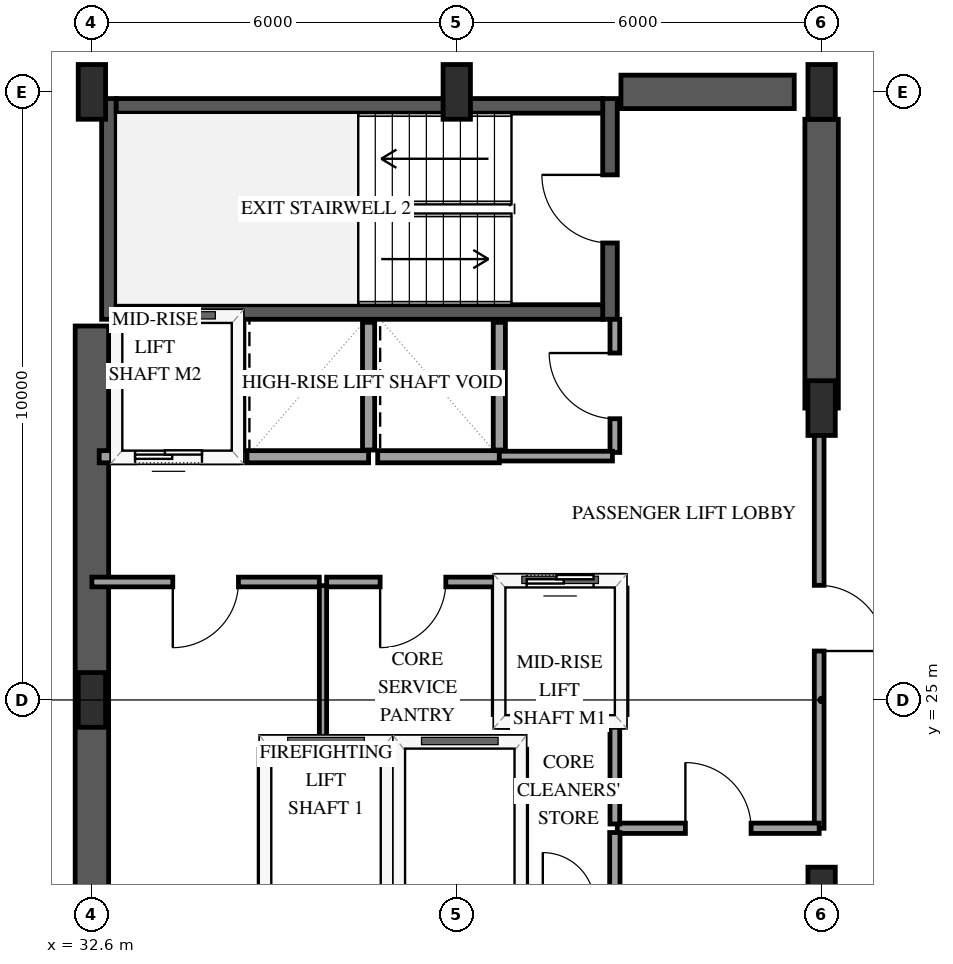
"""IFC4 building model, lengths in metres.
Left out: names, types, materials, properties, quantities, classifications, styles, units other than length and angle.
Written with IfcOpenShell. Run it as: python <this file> out.ifc"""

import sys

from ifc_helpers import new_model, si_unit, direction, frame, frame_2d, origin, origin_2d, place, context, subcontext, project, spatial, rectangle, extrude, element, fill, save


model = new_model("IFC4")
c1 = context("Model", 3, precision=1e-05, world=origin(), true_north=direction((0.0, 1.0)))
c2 = subcontext(c1, "Body", "Model", "MODEL_VIEW")
j1 = project(units=[si_unit("LENGTHUNIT", "METRE"), si_unit("PLANEANGLEUNIT", "RADIAN")], contexts=[c1])
p1 = place(None, origin())
s1 = spatial("IfcSite", under=j1, at=p1, CompositionType="ELEMENT")
p2 = place(p1, origin())
s2 = spatial("IfcBuilding", under=s1, at=p2, CompositionType="ELEMENT")
p3 = place(p2, frame((0.0, 0.0, 171.4)))
s3 = spatial("IfcBuildingStorey", under=s2, at=p3, CompositionType="ELEMENT", Elevation=171.4)
p4 = place(p3, frame((32.88, 31.26, 0.0), z_axis=(0.0, 0.0, 1.0), x_axis=(0.0, 1.0, 0.0)))
e1 = element("IfcWall", 1, at=p4, inside=s3, PredefinedType="SHEAR", context=c2, shape_type="SweptSolid", body=[
    extrude(rectangle(XDim=3.63, YDim=0.24, at=frame_2d((1.815, 0.0))), origin(), (0.0, 0.0, 1.0), 3.6),
])
p5 = place(p3, frame((41.12, 31.26, 0.0), z_axis=(0.0, 0.0, 1.0), x_axis=(0.0, 1.0, 0.0)))
e2 = element("IfcWall", 2, at=p5, inside=s3, PredefinedType="SHEAR", context=c2, shape_type="SweptSolid", body=[
    extrude(rectangle(XDim=3.63, YDim=0.24, at=frame_2d((1.815, 0.0))), origin(), (0.0, 0.0, 1.0), 3.6),
])
p6 = place(p5, frame((1.255, 0.0, 0.0)))
e3 = element("IfcOpeningElement", 3, at=p6, cuts=e2, PredefinedType="OPENING", context=c2, shape_type="SweptSolid", body=[
    extrude(rectangle(XDim=1.12, YDim=2.15, at=frame_2d((0.56, 1.075))), frame((0.0, 0.13, 0.0), z_axis=(0.0, -1.0, 0.0), x_axis=(1.0, 0.0, 0.0)), (0.0, 0.0, 1.0), 0.26),
])
for number, where, z_axis, x_axis in (
    (4, (33.0, 31.38, 0.0), (0.0, 0.0, 1.0), (1.0, 0.0, 0.0)),
    (5, (33.0, 34.77, 0.0), (0.0, 0.0, 1.0), (1.0, 0.0, 0.0)),
):
    element("IfcWall", number, at=place(p3, frame(where, z_axis=z_axis, x_axis=x_axis)), inside=s3, PredefinedType="SHEAR", context=c2, shape_type="SweptSolid", body=[
        extrude(rectangle(XDim=8.0, YDim=0.24, at=frame_2d((4.0, 0.0))), origin(), (0.0, 0.0, 1.0), 3.6),
    ])
p7 = place(p3, frame((32.6, 18.85, 0.0), z_axis=(0.0, 0.0, 1.0), x_axis=(0.0, 1.0, 0.0)))
e6 = element("IfcWall", 6, at=p7, inside=s3, PredefinedType="SHEAR", context=c2, shape_type="SweptSolid", body=[
    extrude(rectangle(XDim=12.3, YDim=0.55, at=frame_2d((6.15, 0.0))), origin(), (0.0, 0.0, 1.0), 3.6),
])
p8 = place(p3, frame((41.3, 35.0, 0.0), z_axis=(0.0, 0.0, 1.0), x_axis=(1.0, 0.0, 0.0)))
e7 = element("IfcWall", 7, at=p8, inside=s3, PredefinedType="SHEAR", context=c2, shape_type="SweptSolid", body=[
    extrude(rectangle(XDim=2.85, YDim=0.55, at=frame_2d((1.425, 0.0))), origin(), (0.0, 0.0, 1.0), 3.6),
])
p9 = place(p3, frame((44.6, 29.8, 0.0), z_axis=(0.0, 0.0, 1.0), x_axis=(0.0, 1.0, 0.0)))
e8 = element("IfcWall", 8, at=p9, inside=s3, PredefinedType="SHEAR", context=c2, shape_type="SweptSolid", body=[
    extrude(rectangle(XDim=4.75, YDim=0.55, at=frame_2d((2.375, 0.0))), origin(), (0.0, 0.0, 1.0), 3.6),
])
for number, where, z_axis, x_axis in (
    (9, (32.6, 25.0, 0.0), (0.0, 0.0, 1.0), (1.0, 0.0, 0.0)),
    (10, (32.6, 35.0, 0.0), (0.0, 0.0, 1.0), (1.0, 0.0, 0.0)),
    (11, (38.6, 35.0, 0.0), (0.0, 0.0, 1.0), (1.0, 0.0, 0.0)),
    (12, (44.6, 21.8, 0.0), (0.0, 0.0, 1.0), (1.0, 0.0, 0.0)),
    (13, (44.6, 29.8, 0.0), (0.0, 0.0, 1.0), (1.0, 0.0, 0.0)),
    (14, (44.6, 35.0, 0.0), (0.0, 0.0, 1.0), (1.0, 0.0, 0.0)),
):
    element("IfcColumn", number, at=place(p3, frame(where, z_axis=z_axis, x_axis=x_axis)), inside=s3, PredefinedType="PILASTER", context=c2, shape_type="SweptSolid", body=[
        extrude(rectangle(XDim=0.45, YDim=0.9, at=origin_2d()), origin(), (0.0, 0.0, 1.0), 3.6),
    ])
p10 = place(p3, frame((35.45, 24.3, 0.0), z_axis=(0.0, 0.0, 1.0), x_axis=(1.0, 0.0, 0.0)))
e15 = element("IfcWall", 15, at=p10, inside=s3, PredefinedType="SOLIDWALL", context=c2, shape_type="SweptSolid", body=[
    extrude(rectangle(XDim=2.0, YDim=0.2, at=frame_2d((1.0, 0.0))), origin(), (0.0, 0.0, 1.0), 3.3),
])
for number, where, z_axis, x_axis in (
    (16, (35.45, 21.81, 0.0), (0.0, 0.0, 1.0), (0.0, 1.0, 0.0)),
    (17, (37.45, 21.81, 0.0), (0.0, 0.0, 1.0), (0.0, 1.0, 0.0)),
):
    element("IfcWall", number, at=place(p3, frame(where, z_axis=z_axis, x_axis=x_axis)), inside=s3, PredefinedType="SOLIDWALL", context=c2, shape_type="SweptSolid", body=[
        extrude(rectangle(XDim=2.38, YDim=0.2, at=frame_2d((1.19, 0.0))), origin(), (0.0, 0.0, 1.0), 3.3),
    ])
p11 = place(p3, frame((37.65, 24.3, 0.0), z_axis=(0.0, 0.0, 1.0), x_axis=(1.0, 0.0, 0.0)))
e18 = element("IfcWall", 18, at=p11, inside=s3, PredefinedType="SOLIDWALL", context=c2, shape_type="SweptSolid", body=[
    extrude(rectangle(XDim=2.0, YDim=0.2, at=frame_2d((1.0, 0.0))), origin(), (0.0, 0.0, 1.0), 3.3),
])
p12 = place(p3, frame((39.65, 21.81, 0.0), z_axis=(0.0, 0.0, 1.0), x_axis=(0.0, 1.0, 0.0)))
e19 = element("IfcWall", 19, at=p12, inside=s3, PredefinedType="SOLIDWALL", context=c2, shape_type="SweptSolid", body=[
    extrude(rectangle(XDim=2.38, YDim=0.2, at=frame_2d((1.19, 0.0))), origin(), (0.0, 0.0, 1.0), 3.3),
])
p13 = place(p3, frame((39.3, 24.65, 0.0), z_axis=(0.0, 0.0, 1.0), x_axis=(1.0, 0.0, 0.0)))
e20 = element("IfcWall", 20, at=p13, inside=s3, PredefinedType="SOLIDWALL", context=c2, shape_type="SweptSolid", body=[
    extrude(rectangle(XDim=2.0, YDim=0.2, at=frame_2d((1.0, 0.0))), origin(), (0.0, 0.0, 1.0), 3.3),
])
p14 = place(p3, frame((39.3, 26.95, 0.0), z_axis=(0.0, 0.0, 1.0), x_axis=(1.0, 0.0, 0.0)))
e21 = element("IfcWall", 21, at=p14, inside=s3, PredefinedType="SOLIDWALL", context=c2, shape_type="SweptSolid", body=[
    extrude(rectangle(XDim=2.0, YDim=0.2, at=frame_2d((1.0, 0.0))), origin(), (0.0, 0.0, 1.0), 3.3),
])
p15 = place(p14, frame((0.45, 0.0, 0.0)))
e22 = element("IfcOpeningElement", 22, at=p15, cuts=e21, PredefinedType="OPENING", context=c2, shape_type="SweptSolid", body=[
    extrude(rectangle(XDim=1.1, YDim=2.15, at=frame_2d((0.55, 1.075))), frame((0.0, 0.11, 0.0), z_axis=(0.0, -1.0, 0.0), x_axis=(1.0, 0.0, 0.0)), (0.0, 0.0, 1.0), 0.22),
])
for number, where, z_axis, x_axis in (
    (23, (39.3, 24.76, 0.0), (0.0, 0.0, 1.0), (0.0, 1.0, 0.0)),
    (24, (41.3, 24.76, 0.0), (0.0, 0.0, 1.0), (0.0, 1.0, 0.0)),
):
    element("IfcWall", number, at=place(p3, frame(where, z_axis=z_axis, x_axis=x_axis)), inside=s3, PredefinedType="SOLIDWALL", context=c2, shape_type="SweptSolid", body=[
        extrude(rectangle(XDim=2.08, YDim=0.2, at=frame_2d((1.04, 0.0))), origin(), (0.0, 0.0, 1.0), 3.3),
    ])
p16 = place(p3, frame((32.72, 29.0, 0.0), z_axis=(0.0, 0.0, 1.0), x_axis=(1.0, 0.0, 0.0)))
e25 = element("IfcWall", 25, at=p16, inside=s3, PredefinedType="SOLIDWALL", context=c2, shape_type="SweptSolid", body=[
    extrude(rectangle(XDim=2.28, YDim=0.2, at=frame_2d((1.14, 0.0))), origin(), (0.0, 0.0, 1.0), 2.674),
])
p17 = place(p16, frame((0.59, 0.0, 0.0)))
e26 = element("IfcOpeningElement", 26, at=p17, cuts=e25, PredefinedType="OPENING", context=c2, shape_type="SweptSolid", body=[
    extrude(rectangle(XDim=1.1, YDim=2.15, at=frame_2d((0.55, 1.075))), frame((0.0, 0.11, 0.0), z_axis=(0.0, -1.0, 0.0), x_axis=(1.0, 0.0, 0.0)), (0.0, 0.0, 1.0), 0.22),
])
p18 = place(p3, frame((35.0, 29.11, 0.0), z_axis=(0.0, 0.0, 1.0), x_axis=(0.0, 1.0, 0.0)))
e27 = element("IfcWall", 27, at=p18, inside=s3, PredefinedType="SOLIDWALL", context=c2, shape_type="SweptSolid", body=[
    extrude(rectangle(XDim=2.1, YDim=0.2, at=frame_2d((1.05, 0.0))), origin(), (0.0, 0.0, 1.0), 3.3),
])
p19 = place(p3, frame((35.15, 29.0, 0.0), z_axis=(0.0, 0.0, 1.0), x_axis=(1.0, 0.0, 0.0)))
e28 = element("IfcWall", 28, at=p19, inside=s3, PredefinedType="SOLIDWALL", context=c2, shape_type="SweptSolid", body=[
    extrude(rectangle(XDim=2.0, YDim=0.2, at=frame_2d((1.0, 0.0))), origin(), (0.0, 0.0, 1.0), 2.674),
])
p20 = place(p3, frame((37.15, 29.11, 0.0), z_axis=(0.0, 0.0, 1.0), x_axis=(0.0, 1.0, 0.0)))
e29 = element("IfcWall", 29, at=p20, inside=s3, PredefinedType="SOLIDWALL", context=c2, shape_type="SweptSolid", body=[
    extrude(rectangle(XDim=2.1, YDim=0.2, at=frame_2d((1.05, 0.0))), origin(), (0.0, 0.0, 1.0), 3.3),
])
p21 = place(p3, frame((37.3, 29.0, 0.0), z_axis=(0.0, 0.0, 1.0), x_axis=(1.0, 0.0, 0.0)))
e30 = element("IfcWall", 30, at=p21, inside=s3, PredefinedType="SOLIDWALL", context=c2, shape_type="SweptSolid", body=[
    extrude(rectangle(XDim=2.0, YDim=0.2, at=frame_2d((1.0, 0.0))), origin(), (0.0, 0.0, 1.0), 2.674),
])
p22 = place(p3, frame((39.3, 29.11, 0.0), z_axis=(0.0, 0.0, 1.0), x_axis=(0.0, 1.0, 0.0)))
e31 = element("IfcWall", 31, at=p22, inside=s3, PredefinedType="SOLIDWALL", context=c2, shape_type="SweptSolid", body=[
    extrude(rectangle(XDim=2.1, YDim=0.2, at=frame_2d((1.05, 0.0))), origin(), (0.0, 0.0, 1.0), 3.3),
])
p23 = place(p3, frame((44.56, 29.8, 0.0), z_axis=(0.0, 0.0, 1.0), x_axis=(0.0, -1.0, 0.0)))
e32 = element("IfcWall", 32, at=p23, inside=s3, PredefinedType="PARTITIONING", context=c2, shape_type="SweptSolid", body=[
    extrude(rectangle(XDim=6.91, YDim=0.16, at=frame_2d((3.455, 0.0))), origin(), (0.0, 0.0, 1.0), 2.34),
])
p24 = place(p23, frame((2.915, 0.0, 0.0)))
e33 = element("IfcOpeningElement", 33, at=p24, cuts=e32, PredefinedType="OPENING", context=c2, shape_type="SweptSolid", body=[
    extrude(rectangle(XDim=1.08, YDim=2.15, at=frame_2d((0.54, 1.075))), frame((0.0, 0.09, 0.0), z_axis=(0.0, -1.0, 0.0), x_axis=(1.0, 0.0, 0.0)), (0.0, 0.0, 1.0), 0.18),
])
p25 = place(p3, frame((36.34, 26.94, 0.0), z_axis=(0.0, 0.0, 1.0), x_axis=(-1.0, 0.0, 0.0)))
e34 = element("IfcWall", 34, at=p25, inside=s3, PredefinedType="PARTITIONING", context=c2, shape_type="SweptSolid", body=[
    extrude(rectangle(XDim=3.74, YDim=0.16, at=frame_2d((1.87, 0.0))), origin(), (0.0, 0.0, 1.0), 3.3),
])
p26 = place(p25, frame((1.33, 0.0, 0.0)))
e35 = element("IfcOpeningElement", 35, at=p26, cuts=e34, PredefinedType="OPENING", context=c2, shape_type="SweptSolid", body=[
    extrude(rectangle(XDim=1.08, YDim=2.15, at=frame_2d((0.54, 1.075))), frame((0.0, 0.09, 0.0), z_axis=(0.0, -1.0, 0.0), x_axis=(1.0, 0.0, 0.0)), (0.0, 0.0, 1.0), 0.18),
])
p27 = place(p3, frame((41.24, 22.89, 0.0), z_axis=(0.0, 0.0, 1.0), x_axis=(1.0, 0.0, 0.0)))
e36 = element("IfcWall", 36, at=p27, inside=s3, PredefinedType="PARTITIONING", context=c2, shape_type="SweptSolid", body=[
    extrude(rectangle(XDim=3.32, YDim=0.17, at=frame_2d((1.66, 0.0))), origin(), (0.0, 0.0, 1.0), 3.3),
])
p28 = place(p27, frame((1.12, 0.0, 0.0)))
e37 = element("IfcOpeningElement", 37, at=p28, cuts=e36, PredefinedType="OPENING", context=c2, shape_type="SweptSolid", body=[
    extrude(rectangle(XDim=1.08, YDim=2.15, at=frame_2d((0.54, 1.075))), frame((0.0, 0.095, 0.0), z_axis=(0.0, -1.0, 0.0), x_axis=(1.0, 0.0, 0.0)), (0.0, 0.0, 1.0), 0.19),
])
p29 = place(p3, frame((39.3, 26.94, 0.0), z_axis=(0.0, 0.0, 1.0), x_axis=(-1.0, 0.0, 0.0)))
e38 = element("IfcWall", 38, at=p29, inside=s3, PredefinedType="PARTITIONING", context=c2, shape_type="SweptSolid", body=[
    extrude(rectangle(XDim=2.84, YDim=0.16, at=frame_2d((1.42, 0.0))), origin(), (0.0, 0.0, 1.0), 3.3),
])
p30 = place(p29, frame((0.88, 0.0, 0.0)))
e39 = element("IfcOpeningElement", 39, at=p30, cuts=e38, PredefinedType="OPENING", context=c2, shape_type="SweptSolid", body=[
    extrude(rectangle(XDim=1.08, YDim=2.15, at=frame_2d((0.54, 1.075))), frame((0.0, 0.09, 0.0), z_axis=(0.0, -1.0, 0.0), x_axis=(1.0, 0.0, 0.0)), (0.0, 0.0, 1.0), 0.18),
])
p31 = place(p3, frame((36.4, 26.88, 0.0), z_axis=(0.0, 0.0, 1.0), x_axis=(0.0, -1.0, 0.0)))
e40 = element("IfcWall", 40, at=p31, inside=s3, PredefinedType="PARTITIONING", context=c2, shape_type="SweptSolid", body=[
    extrude(rectangle(XDim=2.58, YDim=0.12, at=frame_2d((1.29, 0.0))), origin(), (0.0, 0.0, 1.0), 3.3),
])
p32 = place(p3, frame((41.2, 29.07, 0.0), z_axis=(0.0, 0.0, 1.0), x_axis=(0.0, 1.0, 0.0)))
e41 = element("IfcWall", 41, at=p32, inside=s3, PredefinedType="PARTITIONING", context=c2, shape_type="SweptSolid", body=[
    extrude(rectangle(XDim=2.19, YDim=0.16, at=frame_2d((1.095, 0.0))), origin(), (0.0, 0.0, 1.0), 3.3),
])
p33 = place(p32, frame((0.555, 0.0, 0.0)))
e42 = element("IfcOpeningElement", 42, at=p33, cuts=e41, PredefinedType="OPENING", context=c2, shape_type="SweptSolid", body=[
    extrude(rectangle(XDim=1.08, YDim=2.15, at=frame_2d((0.54, 1.075))), frame((0.0, 0.09, 0.0), z_axis=(0.0, -1.0, 0.0), x_axis=(1.0, 0.0, 0.0)), (0.0, 0.0, 1.0), 0.18),
])
p34 = place(p3, frame((39.3, 29.01, 0.0), z_axis=(0.0, 0.0, 1.0), x_axis=(1.0, 0.0, 0.0)))
e43 = element("IfcWall", 43, at=p34, inside=s3, PredefinedType="PARTITIONING", context=c2, shape_type="SweptSolid", body=[
    extrude(rectangle(XDim=1.86, YDim=0.16, at=frame_2d((0.93, 0.0))), origin(), (0.0, 0.0, 1.0), 2.674),
])
p35 = place(p3, frame((41.2, 22.96, 0.0), z_axis=(0.0, 0.0, 1.0), x_axis=(0.0, 1.0, 0.0)))
e44 = element("IfcWall", 44, at=p35, inside=s3, PredefinedType="PARTITIONING", context=c2, shape_type="SweptSolid", body=[
    extrude(rectangle(XDim=1.69, YDim=0.16, at=frame_2d((0.845, 0.0))), origin(), (0.0, 0.0, 1.0), 3.3),
])
p36 = place(p3, frame((41.2, 21.7, 0.0), z_axis=(0.0, 0.0, 1.0), x_axis=(0.0, 1.0, 0.0)))
e45 = element("IfcWall", 45, at=p36, inside=s3, PredefinedType="PARTITIONING", context=c2, shape_type="SweptSolid", body=[
    extrude(rectangle(XDim=1.12, YDim=0.17, at=frame_2d((0.56, 0.0))), origin(), (0.0, 0.0, 1.0), 3.3),
])
p37 = place(p15, origin())
e46 = element("IfcDoor", 46, at=p37, inside=s3, OperationType="SLIDING_TO_LEFT", PredefinedType="DOOR", context=c2, shape_type="SweptSolid", body=[
    extrude(rectangle(XDim=1.1, YDim=2.15, at=frame_2d((0.55, 1.075))), frame((0.0, 0.025, 0.0), z_axis=(0.0, -1.0, 0.0), x_axis=(1.0, 0.0, 0.0)), (0.0, 0.0, 1.0), 0.05),
])
fill(e22, e46)
p38 = place(p17, origin())
e47 = element("IfcDoor", 47, at=p38, inside=s3, OperationType="SLIDING_TO_LEFT", PredefinedType="DOOR", context=c2, shape_type="SweptSolid", body=[
    extrude(rectangle(XDim=1.1, YDim=2.15, at=frame_2d((0.55, 1.075))), frame((0.0, 0.025, 0.0), z_axis=(0.0, -1.0, 0.0), x_axis=(1.0, 0.0, 0.0)), (0.0, 0.0, 1.0), 0.05),
])
fill(e26, e47)
p39 = place(p6, origin())
e48 = element("IfcDoor", 48, at=p39, inside=s3, OperationType="SINGLE_SWING_RIGHT", PredefinedType="DOOR", context=c2, shape_type="SweptSolid", body=[
    extrude(rectangle(XDim=1.12, YDim=2.15, at=frame_2d((0.56, 1.075))), frame((0.0, 0.025, 0.0), z_axis=(0.0, -1.0, 0.0), x_axis=(1.0, 0.0, 0.0)), (0.0, 0.0, 1.0), 0.05),
])
fill(e3, e48)
p40 = place(p24, origin())
e49 = element("IfcDoor", 49, at=p40, inside=s3, OperationType="SINGLE_SWING_RIGHT", PredefinedType="DOOR", context=c2, shape_type="SweptSolid", body=[
    extrude(rectangle(XDim=1.08, YDim=2.15, at=frame_2d((0.54, 1.075))), frame((0.0, 0.025, 0.0), z_axis=(0.0, -1.0, 0.0), x_axis=(1.0, 0.0, 0.0)), (0.0, 0.0, 1.0), 0.05),
])
fill(e33, e49)
p41 = place(p26, origin())
e50 = element("IfcDoor", 50, at=p41, inside=s3, OperationType="SINGLE_SWING_RIGHT", PredefinedType="DOOR", context=c2, shape_type="SweptSolid", body=[
    extrude(rectangle(XDim=1.08, YDim=2.15, at=frame_2d((0.54, 1.075))), frame((0.0, 0.025, 0.0), z_axis=(0.0, -1.0, 0.0), x_axis=(1.0, 0.0, 0.0)), (0.0, 0.0, 1.0), 0.05),
])
fill(e35, e50)
p42 = place(p28, origin())
e51 = element("IfcDoor", 51, at=p42, inside=s3, OperationType="SINGLE_SWING_LEFT", PredefinedType="DOOR", context=c2, shape_type="SweptSolid", body=[
    extrude(rectangle(XDim=1.08, YDim=2.15, at=frame_2d((0.54, 1.075))), frame((0.0, 0.025, 0.0), z_axis=(0.0, -1.0, 0.0), x_axis=(1.0, 0.0, 0.0)), (0.0, 0.0, 1.0), 0.05),
])
fill(e37, e51)
p43 = place(p30, origin())
e52 = element("IfcDoor", 52, at=p43, inside=s3, OperationType="SINGLE_SWING_RIGHT", PredefinedType="DOOR", context=c2, shape_type="SweptSolid", body=[
    extrude(rectangle(XDim=1.08, YDim=2.15, at=frame_2d((0.54, 1.075))), frame((0.0, 0.025, 0.0), z_axis=(0.0, -1.0, 0.0), x_axis=(1.0, 0.0, 0.0)), (0.0, 0.0, 1.0), 0.05),
])
fill(e39, e52)
p44 = place(p33, origin())
e53 = element("IfcDoor", 53, at=p44, inside=s3, OperationType="SINGLE_SWING_RIGHT", PredefinedType="DOOR", context=c2, shape_type="SweptSolid", body=[
    extrude(rectangle(XDim=1.08, YDim=2.15, at=frame_2d((0.54, 1.075))), frame((0.0, 0.025, 0.0), z_axis=(0.0, -1.0, 0.0), x_axis=(1.0, 0.0, 0.0)), (0.0, 0.0, 1.0), 0.05),
])
fill(e42, e53)
save(model, sys.argv[1])
